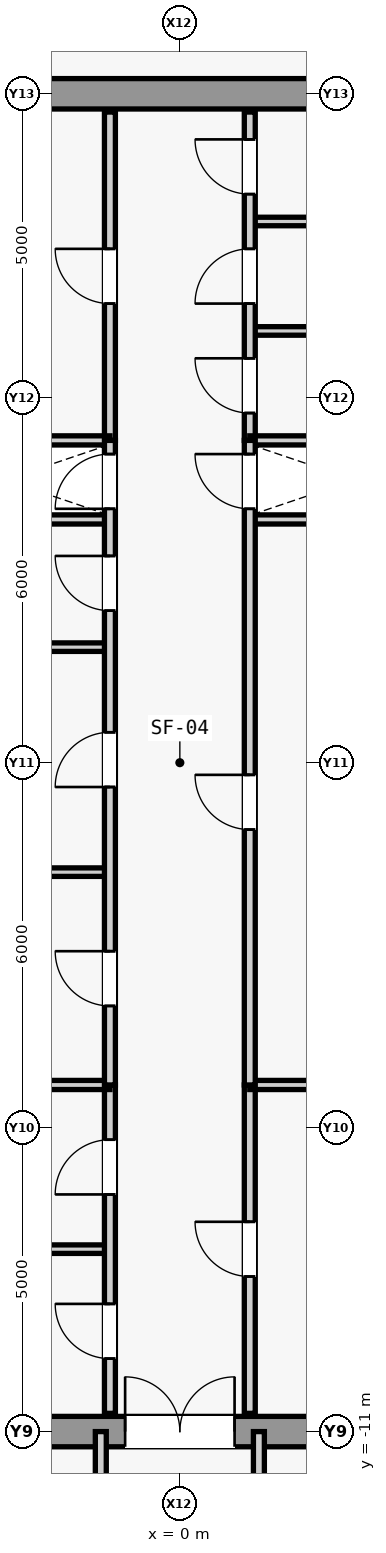
"""IFC4 building model, lengths in metres.
Left out: names, types, materials, properties, quantities, classifications, styles, units other than length and angle.
Written with IfcOpenShell. Run it as: python <this file> out.ifc"""

import sys

from ifc_helpers import new_model, si_unit, direction, frame, frame_2d, origin, place, context, subcontext, project, spatial, rectangle, extrude, source, transform, mapped, element, fill, save


model = new_model("IFC4")
c1 = context("Model", 3, precision=1e-05, world=origin(), true_north=direction((0.0, 1.0)))
c2 = subcontext(c1, "Body", "Model", "MODEL_VIEW")
j1 = project(units=[si_unit("LENGTHUNIT", "METRE"), si_unit("PLANEANGLEUNIT", "RADIAN")], contexts=[c1])
p1 = place(None, origin())
s1 = spatial("IfcSite", under=j1, at=p1, CompositionType="ELEMENT")
p2 = place(p1, origin())
s2 = spatial("IfcBuilding", under=s1, at=p2, CompositionType="ELEMENT")
p3 = place(p2, frame((0.0, 0.0, 301.5)))
s3 = spatial("IfcBuildingStorey", under=s2, at=p3, CompositionType="ELEMENT", Elevation=301.5)
m1 = source(origin(), c2, "Body", "SweptSolid", [
    extrude(rectangle(XDim=9.2, YDim=0.5, at=frame_2d((4.6, 0.0))), origin(), (0.0, 0.0, 1.0), 3.78),
])
p4 = place(p3, frame((-4.6, -11.0, 0.0), z_axis=(0.0, 0.0, 1.0), x_axis=(1.0, 0.0, 0.0)))
e1 = element("IfcWall", 1, at=p4, inside=s3, PredefinedType="SHEAR", context=c2, shape_type="MappedRepresentation", body=[
    mapped(m1, transform((0.0, 0.0, 0.0), scale=1.0)),
])
m2 = source(origin(), c2, "Body", "SweptSolid", [
    extrude(rectangle(XDim=1.8, YDim=2.25, at=frame_2d((0.9, 1.125))), frame((0.0, 0.26, 0.0), z_axis=(0.0, -1.0, 0.0), x_axis=(1.0, 0.0, 0.0)), (0.0, 0.0, 1.0), 0.52),
])
p5 = place(p4, frame((3.7, 0.0, 0.0)))
e2 = element("IfcOpeningElement", 2, at=p5, cuts=e1, PredefinedType="OPENING", context=c2, shape_type="MappedRepresentation", body=[
    mapped(m2, transform((0.0, 0.0, 0.0), scale=1.0)),
])
p6 = place(p3, frame((-4.6, 11.0, 0.0), z_axis=(0.0, 0.0, 1.0), x_axis=(1.0, 0.0, 0.0)))
e3 = element("IfcWall", 3, at=p6, inside=s3, PredefinedType="SHEAR", context=c2, shape_type="MappedRepresentation", body=[
    mapped(m1, transform((0.0, 0.0, 0.0), scale=1.0)),
])
m3 = source(origin(), c2, "Body", "SweptSolid", [
    extrude(rectangle(XDim=3.45, YDim=0.15, at=frame_2d((1.725, 0.0))), origin(), (0.0, 0.0, 1.0), 3.78),
])
for number, where, z_axis, x_axis in (
    (4, (-4.6, 4.0, 0.0), (0.0, 0.0, 1.0), (1.0, 0.0, 0.0)),
    (5, (1.15, 4.0, 0.0), (0.0, 0.0, 1.0), (1.0, 0.0, 0.0)),
):
    element("IfcWall", number, at=place(p3, frame(where, z_axis=z_axis, x_axis=x_axis)), inside=s3, PredefinedType="PARTITIONING", context=c2, shape_type="MappedRepresentation", body=[
        mapped(m3, transform((0.0, 0.0, 0.0), scale=1.0)),
    ])
m4 = source(origin(), c2, "Body", "SweptSolid", [
    extrude(rectangle(XDim=3.45, YDim=0.14, at=frame_2d((1.725, 0.0))), origin(), (0.0, 0.0, 1.0), 3.78),
])
p7 = place(p3, frame((-4.6, -8.0, 0.0), z_axis=(0.0, 0.0, 1.0), x_axis=(1.0, 0.0, 0.0)))
e6 = element("IfcWall", 6, at=p7, inside=s3, PredefinedType="PARTITIONING", context=c2, shape_type="MappedRepresentation", body=[
    mapped(m4, transform((0.0, 0.0, 0.0), scale=1.0)),
])
m5 = source(origin(), c2, "Body", "SweptSolid", [
    extrude(rectangle(XDim=5.4, YDim=0.18, at=frame_2d((2.7, 0.0))), origin(), (0.0, 0.0, 1.0), 3.78),
])
p8 = place(p3, frame((-1.15, -10.7, 0.0), z_axis=(0.0, 0.0, 1.0), x_axis=(0.0, 1.0, 0.0)))
e7 = element("IfcWall", 7, at=p8, inside=s3, PredefinedType="PARTITIONING", context=c2, shape_type="MappedRepresentation", body=[
    mapped(m5, transform((0.0, 0.0, 0.0), scale=1.0)),
])
m6 = source(origin(), c2, "Body", "SweptSolid", [
    extrude(rectangle(XDim=0.9, YDim=2.15, at=frame_2d((0.45, 1.075))), frame((0.0, 0.1, 0.0), z_axis=(0.0, -1.0, 0.0), x_axis=(1.0, 0.0, 0.0)), (0.0, 0.0, 1.0), 0.2),
])
p9 = place(p8, frame((0.9, 0.0, 0.0)))
e8 = element("IfcOpeningElement", 8, at=p9, cuts=e7, PredefinedType="OPENING", context=c2, shape_type="MappedRepresentation", body=[
    mapped(m6, transform((0.0, 0.0, 0.0), scale=1.0)),
])
p10 = place(p8, frame((3.6, 0.0, 0.0)))
e9 = element("IfcOpeningElement", 9, at=p10, cuts=e7, PredefinedType="OPENING", context=c2, shape_type="MappedRepresentation", body=[
    mapped(m6, transform((0.0, 0.0, 0.0), scale=1.0)),
])
p11 = place(p3, frame((1.15, -10.7, 0.0), z_axis=(0.0, 0.0, 1.0), x_axis=(0.0, 1.0, 0.0)))
e10 = element("IfcWall", 10, at=p11, inside=s3, PredefinedType="PARTITIONING", context=c2, shape_type="MappedRepresentation", body=[
    mapped(m5, transform((0.0, 0.0, 0.0), scale=1.0)),
])
p12 = place(p11, frame((2.25, 0.0, 0.0)))
e11 = element("IfcOpeningElement", 11, at=p12, cuts=e10, PredefinedType="OPENING", context=c2, shape_type="MappedRepresentation", body=[
    mapped(m6, transform((0.0, 0.0, 0.0), scale=1.0)),
])
for number, where, z_axis, x_axis in (
    (12, (-4.6, -5.3, 0.0), (0.0, 0.0, 1.0), (1.0, 0.0, 0.0)),
    (13, (1.15, -5.3, 0.0), (0.0, 0.0, 1.0), (1.0, 0.0, 0.0)),
):
    element("IfcWall", number, at=place(p3, frame(where, z_axis=z_axis, x_axis=x_axis)), inside=s3, PredefinedType="PARTITIONING", context=c2, shape_type="MappedRepresentation", body=[
        mapped(m3, transform((0.0, 0.0, 0.0), scale=1.0)),
    ])
p13 = place(p3, frame((-1.15, 5.3, 0.0), z_axis=(0.0, 0.0, 1.0), x_axis=(0.0, 1.0, 0.0)))
e14 = element("IfcWall", 14, at=p13, inside=s3, PredefinedType="PARTITIONING", context=c2, shape_type="MappedRepresentation", body=[
    mapped(m5, transform((0.0, 0.0, 0.0), scale=1.0)),
])
p14 = place(p13, frame((2.25, 0.0, 0.0)))
e15 = element("IfcOpeningElement", 15, at=p14, cuts=e14, PredefinedType="OPENING", context=c2, shape_type="MappedRepresentation", body=[
    mapped(m6, transform((0.0, 0.0, 0.0), scale=1.0)),
])
for number, where, z_axis, x_axis in (
    (16, (1.15, 7.1, 0.0), (0.0, 0.0, 1.0), (1.0, 0.0, 0.0)),
    (17, (1.15, 8.9, 0.0), (0.0, 0.0, 1.0), (1.0, 0.0, 0.0)),
):
    element("IfcWall", number, at=place(p3, frame(where, z_axis=z_axis, x_axis=x_axis)), inside=s3, PredefinedType="PARTITIONING", context=c2, shape_type="MappedRepresentation", body=[
        mapped(m4, transform((0.0, 0.0, 0.0), scale=1.0)),
    ])
p15 = place(p3, frame((1.15, 5.3, 0.0), z_axis=(0.0, 0.0, 1.0), x_axis=(0.0, 1.0, 0.0)))
e18 = element("IfcWall", 18, at=p15, inside=s3, PredefinedType="PARTITIONING", context=c2, shape_type="MappedRepresentation", body=[
    mapped(m5, transform((0.0, 0.0, 0.0), scale=1.0)),
])
p16 = place(p15, frame((0.45, 0.0, 0.0)))
e19 = element("IfcOpeningElement", 19, at=p16, cuts=e18, PredefinedType="OPENING", context=c2, shape_type="MappedRepresentation", body=[
    mapped(m6, transform((0.0, 0.0, 0.0), scale=1.0)),
])
p17 = place(p15, frame((2.25, 0.0, 0.0)))
e20 = element("IfcOpeningElement", 20, at=p17, cuts=e18, PredefinedType="OPENING", context=c2, shape_type="MappedRepresentation", body=[
    mapped(m6, transform((0.0, 0.0, 0.0), scale=1.0)),
])
p18 = place(p15, frame((4.05, 0.0, 0.0)))
e21 = element("IfcOpeningElement", 21, at=p18, cuts=e18, PredefinedType="OPENING", context=c2, shape_type="MappedRepresentation", body=[
    mapped(m6, transform((0.0, 0.0, 0.0), scale=1.0)),
])
for number, where, z_axis, x_axis in (
    (22, (-4.6, 5.3, 0.0), (0.0, 0.0, 1.0), (1.0, 0.0, 0.0)),
    (23, (1.15, 5.3, 0.0), (0.0, 0.0, 1.0), (1.0, 0.0, 0.0)),
):
    element("IfcWall", number, at=place(p3, frame(where, z_axis=z_axis, x_axis=x_axis)), inside=s3, PredefinedType="PARTITIONING", context=c2, shape_type="MappedRepresentation", body=[
        mapped(m3, transform((0.0, 0.0, 0.0), scale=1.0)),
    ])
for number, where, z_axis, x_axis in (
    (24, (-4.6, -1.8, 0.0), (0.0, 0.0, 1.0), (1.0, 0.0, 0.0)),
    (25, (-4.6, 1.9, 0.0), (0.0, 0.0, 1.0), (1.0, 0.0, 0.0)),
):
    element("IfcWall", number, at=place(p3, frame(where, z_axis=z_axis, x_axis=x_axis)), inside=s3, PredefinedType="PARTITIONING", context=c2, shape_type="MappedRepresentation", body=[
        mapped(m4, transform((0.0, 0.0, 0.0), scale=1.0)),
    ])
m7 = source(origin(), c2, "Body", "SweptSolid", [
    extrude(rectangle(XDim=10.6, YDim=0.18, at=frame_2d((5.3, 0.0))), origin(), (0.0, 0.0, 1.0), 3.78),
])
p19 = place(p3, frame((-1.15, -5.3, 0.0), z_axis=(0.0, 0.0, 1.0), x_axis=(0.0, 1.0, 0.0)))
e26 = element("IfcWall", 26, at=p19, inside=s3, PredefinedType="PARTITIONING", context=c2, shape_type="MappedRepresentation", body=[
    mapped(m7, transform((0.0, 0.0, 0.0), scale=1.0)),
])
p20 = place(p19, frame((1.3, 0.0, 0.0)))
e27 = element("IfcOpeningElement", 27, at=p20, cuts=e26, PredefinedType="OPENING", context=c2, shape_type="MappedRepresentation", body=[
    mapped(m6, transform((0.0, 0.0, 0.0), scale=1.0)),
])
p21 = place(p19, frame((4.9, 0.0, 0.0)))
e28 = element("IfcOpeningElement", 28, at=p21, cuts=e26, PredefinedType="OPENING", context=c2, shape_type="MappedRepresentation", body=[
    mapped(m6, transform((0.0, 0.0, 0.0), scale=1.0)),
])
p22 = place(p19, frame((7.8, 0.0, 0.0)))
e29 = element("IfcOpeningElement", 29, at=p22, cuts=e26, PredefinedType="OPENING", context=c2, shape_type="MappedRepresentation", body=[
    mapped(m6, transform((0.0, 0.0, 0.0), scale=1.0)),
])
p23 = place(p19, frame((9.475, 0.0, 0.0)))
e30 = element("IfcOpeningElement", 30, at=p23, cuts=e26, PredefinedType="OPENING", context=c2, shape_type="MappedRepresentation", body=[
    mapped(m6, transform((0.0, 0.0, 0.0), scale=1.0)),
])
p24 = place(p3, frame((1.15, -5.3, 0.0), z_axis=(0.0, 0.0, 1.0), x_axis=(0.0, 1.0, 0.0)))
e31 = element("IfcWall", 31, at=p24, inside=s3, PredefinedType="PARTITIONING", context=c2, shape_type="MappedRepresentation", body=[
    mapped(m7, transform((0.0, 0.0, 0.0), scale=1.0)),
])
p25 = place(p24, frame((4.2, 0.0, 0.0)))
e32 = element("IfcOpeningElement", 32, at=p25, cuts=e31, PredefinedType="OPENING", context=c2, shape_type="MappedRepresentation", body=[
    mapped(m6, transform((0.0, 0.0, 0.0), scale=1.0)),
])
p26 = place(p24, frame((9.475, 0.0, 0.0)))
e33 = element("IfcOpeningElement", 33, at=p26, cuts=e31, PredefinedType="OPENING", context=c2, shape_type="MappedRepresentation", body=[
    mapped(m6, transform((0.0, 0.0, 0.0), scale=1.0)),
])
m8 = source(origin(), c2, "Body", "SweptSolid", [
    extrude(rectangle(XDim=3.9, YDim=0.18, at=frame_2d((1.95, 0.0))), origin(), (0.0, 0.0, 1.0), 3.78),
])
for number, where, z_axis, x_axis in (
    (34, (-1.3, -14.9, 0.0), (0.0, 0.0, 1.0), (0.0, 1.0, 0.0)),
    (35, (1.3, -14.9, 0.0), (0.0, 0.0, 1.0), (0.0, 1.0, 0.0)),
):
    element("IfcWall", number, at=place(p3, frame(where, z_axis=z_axis, x_axis=x_axis)), inside=s3, PredefinedType="PARTITIONING", context=c2, shape_type="MappedRepresentation", body=[
        mapped(m8, transform((0.0, 0.0, 0.0), scale=1.0)),
    ])
m9 = source(origin(), c2, "Body", "SweptSolid", [
    extrude(rectangle(XDim=0.9, YDim=2.15, at=frame_2d((0.45, 1.075))), frame((0.0, 0.025, 0.0), z_axis=(0.0, -1.0, 0.0), x_axis=(1.0, 0.0, 0.0)), (0.0, 0.0, 1.0), 0.05),
])
p27 = place(p9, origin())
e36 = element("IfcDoor", 36, at=p27, inside=s3, OperationType="SINGLE_SWING_RIGHT", PredefinedType="DOOR", context=c2, shape_type="MappedRepresentation", body=[
    mapped(m9, transform((0.0, 0.0, 0.0), scale=1.0)),
])
fill(e8, e36)
p28 = place(p10, origin())
e37 = element("IfcDoor", 37, at=p28, inside=s3, OperationType="SINGLE_SWING_LEFT", PredefinedType="DOOR", context=c2, shape_type="MappedRepresentation", body=[
    mapped(m9, transform((0.0, 0.0, 0.0), scale=1.0)),
])
fill(e9, e37)
p29 = place(p12, origin())
e38 = element("IfcDoor", 38, at=p29, inside=s3, OperationType="SINGLE_SWING_RIGHT", PredefinedType="DOOR", context=c2, shape_type="MappedRepresentation", body=[
    mapped(m9, transform((0.0, 0.0, 0.0), scale=1.0)),
])
fill(e11, e38)
m10 = source(origin(), c2, "Body", "SweptSolid", [
    extrude(rectangle(XDim=1.8, YDim=2.25, at=frame_2d((0.9, 1.125))), frame((0.0, 0.025, 0.0), z_axis=(0.0, -1.0, 0.0), x_axis=(1.0, 0.0, 0.0)), (0.0, 0.0, 1.0), 0.05),
])
p30 = place(p5, origin())
e39 = element("IfcDoor", 39, at=p30, inside=s3, OperationType="SINGLE_SWING_LEFT", PredefinedType="DOOR", context=c2, shape_type="MappedRepresentation", body=[
    mapped(m10, transform((0.0, 0.0, 0.0), scale=1.0)),
])
fill(e2, e39)
p31 = place(p14, origin())
e40 = element("IfcDoor", 40, at=p31, inside=s3, OperationType="SINGLE_SWING_RIGHT", PredefinedType="DOOR", context=c2, shape_type="MappedRepresentation", body=[
    mapped(m9, transform((0.0, 0.0, 0.0), scale=1.0)),
])
fill(e15, e40)
p32 = place(p16, origin())
e41 = element("IfcDoor", 41, at=p32, inside=s3, OperationType="SINGLE_SWING_RIGHT", PredefinedType="DOOR", context=c2, shape_type="MappedRepresentation", body=[
    mapped(m9, transform((0.0, 0.0, 0.0), scale=1.0)),
])
fill(e19, e41)
p33 = place(p17, origin())
e42 = element("IfcDoor", 42, at=p33, inside=s3, OperationType="SINGLE_SWING_LEFT", PredefinedType="DOOR", context=c2, shape_type="MappedRepresentation", body=[
    mapped(m9, transform((0.0, 0.0, 0.0), scale=1.0)),
])
fill(e20, e42)
p34 = place(p18, origin())
e43 = element("IfcDoor", 43, at=p34, inside=s3, OperationType="SINGLE_SWING_RIGHT", PredefinedType="DOOR", context=c2, shape_type="MappedRepresentation", body=[
    mapped(m9, transform((0.0, 0.0, 0.0), scale=1.0)),
])
fill(e21, e43)
p35 = place(p20, origin())
e44 = element("IfcDoor", 44, at=p35, inside=s3, OperationType="SINGLE_SWING_RIGHT", PredefinedType="DOOR", context=c2, shape_type="MappedRepresentation", body=[
    mapped(m9, transform((0.0, 0.0, 0.0), scale=1.0)),
])
fill(e27, e44)
p36 = place(p21, origin())
e45 = element("IfcDoor", 45, at=p36, inside=s3, OperationType="SINGLE_SWING_LEFT", PredefinedType="DOOR", context=c2, shape_type="MappedRepresentation", body=[
    mapped(m9, transform((0.0, 0.0, 0.0), scale=1.0)),
])
fill(e28, e45)
p37 = place(p22, origin())
e46 = element("IfcDoor", 46, at=p37, inside=s3, OperationType="SINGLE_SWING_RIGHT", PredefinedType="DOOR", context=c2, shape_type="MappedRepresentation", body=[
    mapped(m9, transform((0.0, 0.0, 0.0), scale=1.0)),
])
fill(e29, e46)
p38 = place(p25, origin())
e47 = element("IfcDoor", 47, at=p38, inside=s3, OperationType="SINGLE_SWING_RIGHT", PredefinedType="DOOR", context=c2, shape_type="MappedRepresentation", body=[
    mapped(m9, transform((0.0, 0.0, 0.0), scale=1.0)),
])
fill(e32, e47)
p39 = place(p23, origin())
e48 = element("IfcDoor", 48, at=p39, inside=s3, OperationType="SINGLE_SWING_LEFT", PredefinedType="DOOR", context=c2, shape_type="MappedRepresentation", body=[
    mapped(m9, transform((0.0, 0.0, 0.0), scale=1.0)),
])
fill(e30, e48)
p40 = place(p26, origin())
e49 = element("IfcDoor", 49, at=p40, inside=s3, OperationType="SINGLE_SWING_RIGHT", PredefinedType="DOOR", context=c2, shape_type="MappedRepresentation", body=[
    mapped(m9, transform((0.0, 0.0, 0.0), scale=1.0)),
])
fill(e33, e49)
save(model, sys.argv[1])
